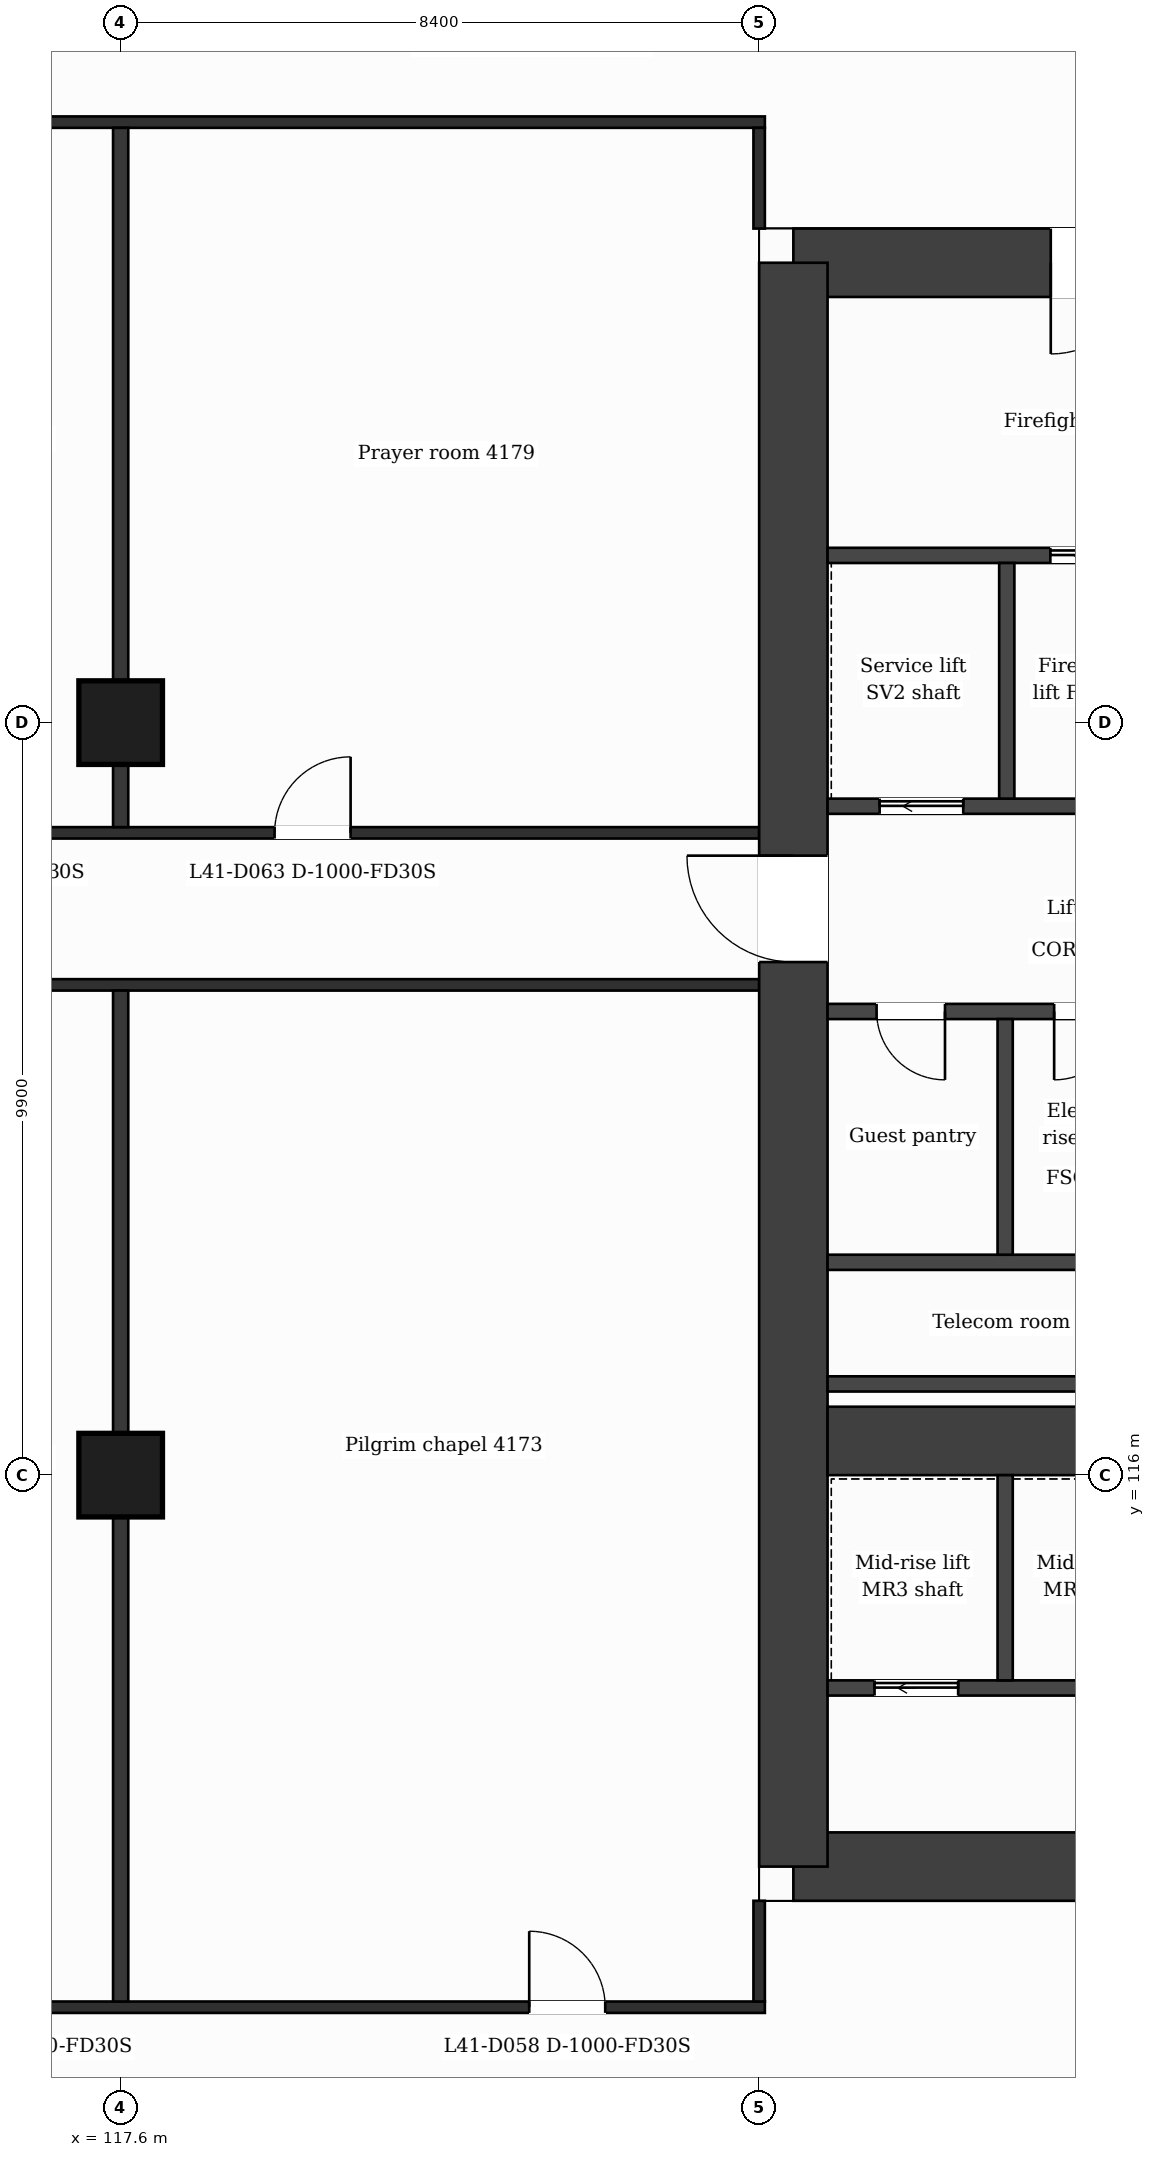
"""IFC4 building model, lengths in metres.
Left out: names, types, materials, properties, quantities, classifications, styles, units other than length and angle.
Written with IfcOpenShell. Run it as: python <this file> out.ifc"""

import sys

from ifc_helpers import new_model, si_unit, direction, frame, frame_2d, origin, origin_2d, place, context, subcontext, project, spatial, rectangle, extrude, element, fill, save


model = new_model("IFC4")
c1 = context("Model", 3, precision=1e-05, world=origin(), true_north=direction((0.0, 1.0)))
c2 = subcontext(c1, "Body", "Model", "MODEL_VIEW")
j1 = project(units=[si_unit("LENGTHUNIT", "METRE"), si_unit("PLANEANGLEUNIT", "RADIAN")], contexts=[c1])
p1 = place(None, origin())
s1 = spatial("IfcSite", under=j1, at=p1, CompositionType="ELEMENT")
p2 = place(p1, origin())
s2 = spatial("IfcBuilding", under=s1, at=p2, CompositionType="ELEMENT")
p3 = place(p2, frame((0.0, 0.0, 173.7)))
s3 = spatial("IfcBuildingStorey", under=s2, at=p3, CompositionType="ELEMENT", Elevation=173.7)
p4 = place(p3, frame((126.45, 131.95, 0.0), z_axis=(0.0, 0.0, 1.0), x_axis=(1.0, 0.0, 0.0)))
e1 = element("IfcWall", 1, at=p4, inside=s3, PredefinedType="SHEAR", context=c2, shape_type="SweptSolid", body=[
    extrude(rectangle(XDim=11.326, YDim=0.9, at=frame_2d((5.663, 0.0))), origin(), (0.0, 0.0, 1.0), 3.7),
])
p5 = place(p4, frame((3.386, 0.0, 0.0)))
e2 = element("IfcOpeningElement", 2, at=p5, cuts=e1, PredefinedType="OPENING", context=c2, shape_type="SweptSolid", body=[
    extrude(rectangle(XDim=1.2, YDim=2.1, at=frame_2d((0.6, 1.05))), frame((0.0, 0.46, 0.0), z_axis=(0.0, -1.0, 0.0), x_axis=(1.0, 0.0, 0.0)), (0.0, 0.0, 1.0), 0.92),
])
p6 = place(p3, frame((140.616, 110.85, 0.0), z_axis=(0.0, 0.0, 1.0), x_axis=(-1.0, 0.0, 0.0)))
e3 = element("IfcWall", 3, at=p6, inside=s3, PredefinedType="SHEAR", context=c2, shape_type="SweptSolid", body=[
    extrude(rectangle(XDim=14.166, YDim=0.9, at=frame_2d((7.083, 0.0))), origin(), (0.0, 0.0, 1.0), 3.7),
])
p7 = place(p6, frame((6.911, 0.0, 0.0)))
e4 = element("IfcOpeningElement", 4, at=p7, cuts=e3, PredefinedType="OPENING", context=c2, shape_type="SweptSolid", body=[
    extrude(rectangle(XDim=1.4, YDim=2.1, at=frame_2d((0.7, 1.05))), frame((0.0, 0.46, 0.0), z_axis=(0.0, -1.0, 0.0), x_axis=(1.0, 0.0, 0.0)), (0.0, 0.0, 1.0), 0.92),
])
p8 = place(p3, frame((126.45, 110.85, 0.0), z_axis=(0.0, 0.0, 1.0), x_axis=(0.0, 1.0, 0.0)))
e5 = element("IfcWall", 5, at=p8, inside=s3, PredefinedType="SHEAR", context=c2, shape_type="SweptSolid", body=[
    extrude(rectangle(XDim=21.1, YDim=0.9, at=frame_2d((10.55, 0.0))), origin(), (0.0, 0.0, 1.0), 3.7),
])
p9 = place(p8, frame((11.9, 0.0, 0.0)))
e6 = element("IfcOpeningElement", 6, at=p9, cuts=e5, PredefinedType="OPENING", context=c2, shape_type="SweptSolid", body=[
    extrude(rectangle(XDim=1.4, YDim=2.1, at=frame_2d((0.7, 1.05))), frame((0.0, 0.46, 0.0), z_axis=(0.0, -1.0, 0.0), x_axis=(1.0, 0.0, 0.0)), (0.0, 0.0, 1.0), 0.92),
])
p10 = place(p3, frame((126.9, 116.45, 0.0), z_axis=(0.0, 0.0, 1.0), x_axis=(1.0, 0.0, 0.0)))
e7 = element("IfcWall", 7, at=p10, inside=s3, PredefinedType="SHEAR", context=c2, shape_type="SweptSolid", body=[
    extrude(rectangle(XDim=5.1, YDim=0.9, at=frame_2d((2.55, 0.0))), origin(), (0.0, 0.0, 1.0), 3.7),
])
for number, where, z_axis, x_axis in (
    (8, (117.6, 116.0, 0.0), (0.0, 0.0, 1.0), (1.0, 0.0, 0.0)),
    (9, (117.6, 125.9, 0.0), (0.0, 0.0, 1.0), (1.0, 0.0, 0.0)),
):
    element("IfcColumn", number, at=place(p3, frame(where, z_axis=z_axis, x_axis=x_axis)), inside=s3, PredefinedType="COLUMN", context=c2, shape_type="SweptSolid", body=[
        extrude(rectangle(XDim=1.1, YDim=1.1, at=origin_2d()), origin(), (0.0, 0.0, 1.0), 3.7),
    ])
p11 = place(p3, frame((100.725, 109.0, 0.0), z_axis=(0.0, 0.0, 1.0), x_axis=(1.0, 0.0, 0.0)))
e10 = element("IfcWall", 10, at=p11, inside=s3, PredefinedType="PARTITIONING", context=c2, shape_type="SweptSolid", body=[
    extrude(rectangle(XDim=25.35, YDim=0.15, at=frame_2d((12.675, 0.0))), origin(), (0.0, 0.0, 1.0), 3.38),
])
p12 = place(p11, frame((2.3, 0.0, 0.0)))
e11 = element("IfcOpeningElement", 11, at=p12, cuts=e10, PredefinedType="OPENING", context=c2, shape_type="SweptSolid", body=[
    extrude(rectangle(XDim=1.0, YDim=2.1, at=frame_2d((0.5, 1.05))), frame((0.0, 0.085, 0.0), z_axis=(0.0, -1.0, 0.0), x_axis=(1.0, 0.0, 0.0)), (0.0, 0.0, 1.0), 0.17),
])
p13 = place(p11, frame((6.5, 0.0, 0.0)))
e12 = element("IfcOpeningElement", 12, at=p13, cuts=e10, PredefinedType="OPENING", context=c2, shape_type="SweptSolid", body=[
    extrude(rectangle(XDim=1.0, YDim=2.1, at=frame_2d((0.5, 1.05))), frame((0.0, 0.085, 0.0), z_axis=(0.0, -1.0, 0.0), x_axis=(1.0, 0.0, 0.0)), (0.0, 0.0, 1.0), 0.17),
])
p14 = place(p11, frame((10.075, 0.0, 0.0)))
e13 = element("IfcOpeningElement", 13, at=p14, cuts=e10, PredefinedType="OPENING", context=c2, shape_type="SweptSolid", body=[
    extrude(rectangle(XDim=1.0, YDim=2.1, at=frame_2d((0.5, 1.05))), frame((0.0, 0.085, 0.0), z_axis=(0.0, -1.0, 0.0), x_axis=(1.0, 0.0, 0.0)), (0.0, 0.0, 1.0), 0.17),
])
p15 = place(p11, frame((14.9, 0.0, 0.0)))
e14 = element("IfcOpeningElement", 14, at=p15, cuts=e10, PredefinedType="OPENING", context=c2, shape_type="SweptSolid", body=[
    extrude(rectangle(XDim=1.0, YDim=2.1, at=frame_2d((0.5, 1.05))), frame((0.0, 0.085, 0.0), z_axis=(0.0, -1.0, 0.0), x_axis=(1.0, 0.0, 0.0)), (0.0, 0.0, 1.0), 0.17),
])
p16 = place(p11, frame((22.25, 0.0, 0.0)))
e15 = element("IfcOpeningElement", 15, at=p16, cuts=e10, PredefinedType="OPENING", context=c2, shape_type="SweptSolid", body=[
    extrude(rectangle(XDim=1.0, YDim=2.1, at=frame_2d((0.5, 1.05))), frame((0.0, 0.085, 0.0), z_axis=(0.0, -1.0, 0.0), x_axis=(1.0, 0.0, 0.0)), (0.0, 0.0, 1.0), 0.17),
])
p17 = place(p3, frame((126.9, 113.2, 0.0), z_axis=(0.0, 0.0, 1.0), x_axis=(1.0, 0.0, 0.0)))
e16 = element("IfcWall", 16, at=p17, inside=s3, PredefinedType="PARTITIONING", context=c2, shape_type="SweptSolid", body=[
    extrude(rectangle(XDim=4.773, YDim=0.2, at=frame_2d((2.387, 0.0))), origin(), (0.0, 0.0, 1.0), 3.38),
])
p18 = place(p17, frame((0.618, 0.0, 0.0)))
e17 = element("IfcOpeningElement", 17, at=p18, cuts=e16, PredefinedType="OPENING", context=c2, shape_type="SweptSolid", body=[
    extrude(rectangle(XDim=1.1, YDim=2.1, at=frame_2d((0.55, 1.05))), frame((0.0, 0.11, 0.0), z_axis=(0.0, -1.0, 0.0), x_axis=(1.0, 0.0, 0.0)), (0.0, 0.0, 1.0), 0.22),
])
for number, where, z_axis, x_axis in (
    (18, (126.9, 117.2, 0.0), (0.0, 0.0, 1.0), (1.0, 0.0, 0.0)),
    (19, (126.9, 118.8, 0.0), (0.0, 0.0, 1.0), (1.0, 0.0, 0.0)),
):
    element("IfcWall", number, at=place(p3, frame(where, z_axis=z_axis, x_axis=x_axis)), inside=s3, PredefinedType="PARTITIONING", context=c2, shape_type="SweptSolid", body=[
        extrude(rectangle(XDim=4.673, YDim=0.2, at=frame_2d((2.336, 0.0))), origin(), (0.0, 0.0, 1.0), 3.38),
    ])
p19 = place(p3, frame((126.9, 122.1, 0.0), z_axis=(0.0, 0.0, 1.0), x_axis=(1.0, 0.0, 0.0)))
e20 = element("IfcWall", 20, at=p19, inside=s3, PredefinedType="PARTITIONING", context=c2, shape_type="SweptSolid", body=[
    extrude(rectangle(XDim=4.673, YDim=0.2, at=frame_2d((2.336, 0.0))), origin(), (0.0, 0.0, 1.0), 3.38),
])
p20 = place(p19, frame((2.981, 0.0, 0.0)))
e21 = element("IfcOpeningElement", 21, at=p20, cuts=e20, PredefinedType="OPENING", context=c2, shape_type="SweptSolid", body=[
    extrude(rectangle(XDim=0.9, YDim=2.1, at=frame_2d((0.45, 1.05))), frame((0.0, 0.11, 0.0), z_axis=(0.0, -1.0, 0.0), x_axis=(1.0, 0.0, 0.0)), (0.0, 0.0, 1.0), 0.22),
])
p21 = place(p19, frame((0.645, 0.0, 0.0)))
e22 = element("IfcOpeningElement", 22, at=p21, cuts=e20, PredefinedType="OPENING", context=c2, shape_type="SweptSolid", body=[
    extrude(rectangle(XDim=0.9, YDim=2.1, at=frame_2d((0.45, 1.05))), frame((0.0, 0.11, 0.0), z_axis=(0.0, -1.0, 0.0), x_axis=(1.0, 0.0, 0.0)), (0.0, 0.0, 1.0), 0.22),
])
p22 = place(p3, frame((100.8, 122.45, 0.0), z_axis=(0.0, 0.0, 1.0), x_axis=(1.0, 0.0, 0.0)))
e23 = element("IfcWall", 23, at=p22, inside=s3, PredefinedType="PARTITIONING", context=c2, shape_type="SweptSolid", body=[
    extrude(rectangle(XDim=25.2, YDim=0.15, at=frame_2d((12.6, 0.0))), origin(), (0.0, 0.0, 1.0), 3.38),
])
p23 = place(p3, frame((100.8, 124.45, 0.0), z_axis=(0.0, 0.0, 1.0), x_axis=(1.0, 0.0, 0.0)))
e24 = element("IfcWall", 24, at=p23, inside=s3, PredefinedType="PARTITIONING", context=c2, shape_type="SweptSolid", body=[
    extrude(rectangle(XDim=25.2, YDim=0.15, at=frame_2d((12.6, 0.0))), origin(), (0.0, 0.0, 1.0), 3.38),
])
p24 = place(p23, frame((0.975, 0.0, 0.0)))
e25 = element("IfcOpeningElement", 25, at=p24, cuts=e24, PredefinedType="OPENING", context=c2, shape_type="SweptSolid", body=[
    extrude(rectangle(XDim=1.0, YDim=2.1, at=frame_2d((0.5, 1.05))), frame((0.0, 0.085, 0.0), z_axis=(0.0, -1.0, 0.0), x_axis=(1.0, 0.0, 0.0)), (0.0, 0.0, 1.0), 0.17),
])
p25 = place(p23, frame((6.05, 0.0, 0.0)))
e26 = element("IfcOpeningElement", 26, at=p25, cuts=e24, PredefinedType="OPENING", context=c2, shape_type="SweptSolid", body=[
    extrude(rectangle(XDim=1.0, YDim=2.1, at=frame_2d((0.5, 1.05))), frame((0.0, 0.085, 0.0), z_axis=(0.0, -1.0, 0.0), x_axis=(1.0, 0.0, 0.0)), (0.0, 0.0, 1.0), 0.17),
])
p26 = place(p23, frame((9.27, 0.0, 0.0)))
e27 = element("IfcOpeningElement", 27, at=p26, cuts=e24, PredefinedType="OPENING", context=c2, shape_type="SweptSolid", body=[
    extrude(rectangle(XDim=1.0, YDim=2.1, at=frame_2d((0.5, 1.05))), frame((0.0, 0.085, 0.0), z_axis=(0.0, -1.0, 0.0), x_axis=(1.0, 0.0, 0.0)), (0.0, 0.0, 1.0), 0.17),
])
p27 = place(p23, frame((14.2, 0.0, 0.0)))
e28 = element("IfcOpeningElement", 28, at=p27, cuts=e24, PredefinedType="OPENING", context=c2, shape_type="SweptSolid", body=[
    extrude(rectangle(XDim=1.0, YDim=2.1, at=frame_2d((0.5, 1.05))), frame((0.0, 0.085, 0.0), z_axis=(0.0, -1.0, 0.0), x_axis=(1.0, 0.0, 0.0)), (0.0, 0.0, 1.0), 0.17),
])
p28 = place(p23, frame((18.825, 0.0, 0.0)))
e29 = element("IfcOpeningElement", 29, at=p28, cuts=e24, PredefinedType="OPENING", context=c2, shape_type="SweptSolid", body=[
    extrude(rectangle(XDim=1.0, YDim=2.1, at=frame_2d((0.5, 1.05))), frame((0.0, 0.085, 0.0), z_axis=(0.0, -1.0, 0.0), x_axis=(1.0, 0.0, 0.0)), (0.0, 0.0, 1.0), 0.17),
])
p29 = place(p3, frame((126.9, 124.8, 0.0), z_axis=(0.0, 0.0, 1.0), x_axis=(1.0, 0.0, 0.0)))
e30 = element("IfcWall", 30, at=p29, inside=s3, PredefinedType="PARTITIONING", context=c2, shape_type="SweptSolid", body=[
    extrude(rectangle(XDim=4.715, YDim=0.2, at=frame_2d((2.358, 0.0))), origin(), (0.0, 0.0, 1.0), 3.38),
])
p30 = place(p29, frame((0.685, 0.0, 0.0)))
e31 = element("IfcOpeningElement", 31, at=p30, cuts=e30, PredefinedType="OPENING", context=c2, shape_type="SweptSolid", body=[
    extrude(rectangle(XDim=1.1, YDim=2.1, at=frame_2d((0.55, 1.05))), frame((0.0, 0.11, 0.0), z_axis=(0.0, -1.0, 0.0), x_axis=(1.0, 0.0, 0.0)), (0.0, 0.0, 1.0), 0.22),
])
p31 = place(p3, frame((126.9, 128.1, 0.0), z_axis=(0.0, 0.0, 1.0), x_axis=(1.0, 0.0, 0.0)))
e32 = element("IfcWall", 32, at=p31, inside=s3, PredefinedType="PARTITIONING", context=c2, shape_type="SweptSolid", body=[
    extrude(rectangle(XDim=4.715, YDim=0.2, at=frame_2d((2.358, 0.0))), origin(), (0.0, 0.0, 1.0), 3.38),
])
p32 = place(p31, frame((2.931, 0.0, 0.0)))
e33 = element("IfcOpeningElement", 33, at=p32, cuts=e32, PredefinedType="OPENING", context=c2, shape_type="SweptSolid", body=[
    extrude(rectangle(XDim=1.1, YDim=2.1, at=frame_2d((0.55, 1.05))), frame((0.0, 0.11, 0.0), z_axis=(0.0, -1.0, 0.0), x_axis=(1.0, 0.0, 0.0)), (0.0, 0.0, 1.0), 0.22),
])
p33 = place(p3, frame((100.725, 133.8, 0.0), z_axis=(0.0, 0.0, 1.0), x_axis=(1.0, 0.0, 0.0)))
e34 = element("IfcWall", 34, at=p33, inside=s3, PredefinedType="PARTITIONING", context=c2, shape_type="SweptSolid", body=[
    extrude(rectangle(XDim=25.35, YDim=0.15, at=frame_2d((12.675, 0.0))), origin(), (0.0, 0.0, 1.0), 3.38),
])
p34 = place(p33, frame((10.7, 0.0, 0.0)))
e35 = element("IfcOpeningElement", 35, at=p34, cuts=e34, PredefinedType="OPENING", context=c2, shape_type="SweptSolid", body=[
    extrude(rectangle(XDim=1.0, YDim=2.1, at=frame_2d((0.5, 1.05))), frame((0.0, 0.085, 0.0), z_axis=(0.0, -1.0, 0.0), x_axis=(1.0, 0.0, 0.0)), (0.0, 0.0, 1.0), 0.17),
])
p35 = place(p3, frame((117.6, 109.075, 0.0), z_axis=(0.0, 0.0, 1.0), x_axis=(0.0, 1.0, 0.0)))
e36 = element("IfcWall", 36, at=p35, inside=s3, PredefinedType="PARTITIONING", context=c2, shape_type="SweptSolid", body=[
    extrude(rectangle(XDim=13.3, YDim=0.2, at=frame_2d((6.65, 0.0))), origin(), (0.0, 0.0, 1.0), 3.38),
])
p36 = place(p3, frame((117.6, 124.525, 0.0), z_axis=(0.0, 0.0, 1.0), x_axis=(0.0, 1.0, 0.0)))
e37 = element("IfcWall", 37, at=p36, inside=s3, PredefinedType="PARTITIONING", context=c2, shape_type="SweptSolid", body=[
    extrude(rectangle(XDim=9.2, YDim=0.2, at=frame_2d((4.6, 0.0))), origin(), (0.0, 0.0, 1.0), 3.38),
])
p37 = place(p3, frame((126.0, 109.075, 0.0), z_axis=(0.0, 0.0, 1.0), x_axis=(0.0, 1.0, 0.0)))
e38 = element("IfcWall", 38, at=p37, inside=s3, PredefinedType="PARTITIONING", context=c2, shape_type="SweptSolid", body=[
    extrude(rectangle(XDim=1.325, YDim=0.15, at=frame_2d((0.663, 0.0))), origin(), (0.0, 0.0, 1.0), 3.38),
])
p38 = place(p3, frame((126.0, 132.4, 0.0), z_axis=(0.0, 0.0, 1.0), x_axis=(0.0, 1.0, 0.0)))
e39 = element("IfcWall", 39, at=p38, inside=s3, PredefinedType="PARTITIONING", context=c2, shape_type="SweptSolid", body=[
    extrude(rectangle(XDim=1.325, YDim=0.15, at=frame_2d((0.663, 0.0))), origin(), (0.0, 0.0, 1.0), 3.38),
])
p39 = place(p3, frame((129.237, 113.3, 0.0), z_axis=(0.0, 0.0, 1.0), x_axis=(0.0, 1.0, 0.0)))
e40 = element("IfcWall", 40, at=p39, inside=s3, PredefinedType="PARTITIONING", context=c2, shape_type="SweptSolid", body=[
    extrude(rectangle(XDim=2.7, YDim=0.2, at=frame_2d((1.35, 0.0))), origin(), (0.0, 0.0, 1.0), 3.38),
])
for number, where, z_axis, x_axis in (
    (41, (129.237, 118.9, 0.0), (0.0, 0.0, 1.0), (0.0, 1.0, 0.0)),
    (42, (129.258, 124.9, 0.0), (0.0, 0.0, 1.0), (0.0, 1.0, 0.0)),
):
    element("IfcWall", number, at=place(p3, frame(where, z_axis=z_axis, x_axis=x_axis)), inside=s3, PredefinedType="PARTITIONING", context=c2, shape_type="SweptSolid", body=[
        extrude(rectangle(XDim=3.1, YDim=0.2, at=frame_2d((1.55, 0.0))), origin(), (0.0, 0.0, 1.0), 3.38),
    ])
p40 = place(p32, origin())
e43 = element("IfcDoor", 43, at=p40, inside=s3, OperationType="SLIDING_TO_LEFT", PredefinedType="DOOR", context=c2, shape_type="SweptSolid", body=[
    extrude(rectangle(XDim=1.1, YDim=2.1, at=frame_2d((0.55, 1.05))), frame((0.0, 0.025, 0.0), z_axis=(0.0, -1.0, 0.0), x_axis=(1.0, 0.0, 0.0)), (0.0, 0.0, 1.0), 0.05),
])
fill(e33, e43)
p41 = place(p30, origin())
e44 = element("IfcDoor", 44, at=p41, inside=s3, OperationType="SLIDING_TO_LEFT", PredefinedType="DOOR", context=c2, shape_type="SweptSolid", body=[
    extrude(rectangle(XDim=1.1, YDim=2.1, at=frame_2d((0.55, 1.05))), frame((0.0, 0.025, 0.0), z_axis=(0.0, -1.0, 0.0), x_axis=(1.0, 0.0, 0.0)), (0.0, 0.0, 1.0), 0.05),
])
fill(e31, e44)
p42 = place(p20, origin())
e45 = element("IfcDoor", 45, at=p42, inside=s3, OperationType="SINGLE_SWING_LEFT", PredefinedType="DOOR", context=c2, shape_type="SweptSolid", body=[
    extrude(rectangle(XDim=0.9, YDim=2.1, at=frame_2d((0.45, 1.05))), frame((0.0, 0.025, 0.0), z_axis=(0.0, -1.0, 0.0), x_axis=(1.0, 0.0, 0.0)), (0.0, 0.0, 1.0), 0.05),
])
fill(e21, e45)
p43 = place(p21, origin())
e46 = element("IfcDoor", 46, at=p43, inside=s3, OperationType="SINGLE_SWING_RIGHT", PredefinedType="DOOR", context=c2, shape_type="SweptSolid", body=[
    extrude(rectangle(XDim=0.9, YDim=2.1, at=frame_2d((0.45, 1.05))), frame((0.0, 0.025, 0.0), z_axis=(0.0, -1.0, 0.0), x_axis=(1.0, 0.0, 0.0)), (0.0, 0.0, 1.0), 0.05),
])
fill(e22, e46)
p44 = place(p18, origin())
e47 = element("IfcDoor", 47, at=p44, inside=s3, OperationType="SLIDING_TO_LEFT", PredefinedType="DOOR", context=c2, shape_type="SweptSolid", body=[
    extrude(rectangle(XDim=1.1, YDim=2.1, at=frame_2d((0.55, 1.05))), frame((0.0, 0.025, 0.0), z_axis=(0.0, -1.0, 0.0), x_axis=(1.0, 0.0, 0.0)), (0.0, 0.0, 1.0), 0.05),
])
fill(e17, e47)
p45 = place(p16, origin())
e48 = element("IfcDoor", 48, at=p45, inside=s3, OperationType="SINGLE_SWING_LEFT", PredefinedType="DOOR", context=c2, shape_type="SweptSolid", body=[
    extrude(rectangle(XDim=1.0, YDim=2.1, at=frame_2d((0.5, 1.05))), frame((0.0, 0.025, 0.0), z_axis=(0.0, -1.0, 0.0), x_axis=(1.0, 0.0, 0.0)), (0.0, 0.0, 1.0), 0.05),
])
fill(e15, e48)
p46 = place(p28, origin())
e49 = element("IfcDoor", 49, at=p46, inside=s3, OperationType="SINGLE_SWING_RIGHT", PredefinedType="DOOR", context=c2, shape_type="SweptSolid", body=[
    extrude(rectangle(XDim=1.0, YDim=2.1, at=frame_2d((0.5, 1.05))), frame((0.0, 0.025, 0.0), z_axis=(0.0, -1.0, 0.0), x_axis=(1.0, 0.0, 0.0)), (0.0, 0.0, 1.0), 0.05),
])
fill(e29, e49)
p47 = place(p5, origin())
e50 = element("IfcDoor", 50, at=p47, inside=s3, OperationType="SINGLE_SWING_LEFT", PredefinedType="DOOR", context=c2, shape_type="SweptSolid", body=[
    extrude(rectangle(XDim=1.2, YDim=2.1, at=frame_2d((0.6, 1.05))), frame((0.0, 0.025, 0.0), z_axis=(0.0, -1.0, 0.0), x_axis=(1.0, 0.0, 0.0)), (0.0, 0.0, 1.0), 0.05),
])
fill(e2, e50)
p48 = place(p9, origin())
e51 = element("IfcDoor", 51, at=p48, inside=s3, OperationType="SINGLE_SWING_RIGHT", PredefinedType="DOOR", context=c2, shape_type="SweptSolid", body=[
    extrude(rectangle(XDim=1.4, YDim=2.1, at=frame_2d((0.7, 1.05))), frame((0.0, 0.025, 0.0), z_axis=(0.0, -1.0, 0.0), x_axis=(1.0, 0.0, 0.0)), (0.0, 0.0, 1.0), 0.05),
])
fill(e6, e51)
save(model, sys.argv[1])
